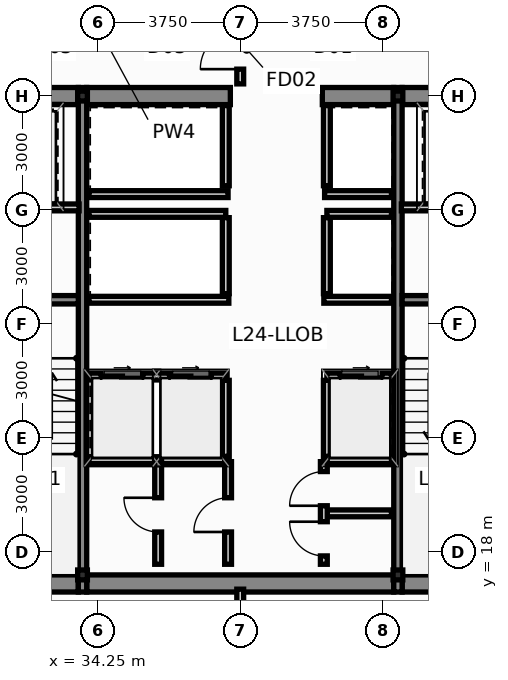
"""IFC4 building model, lengths in metres.
Left out: names, types, materials, properties, quantities, classifications, styles, units other than length and angle.
Written with IfcOpenShell. Run it as: python <this file> out.ifc"""

import sys

from ifc_helpers import new_model, si_unit, direction, frame, frame_2d, origin, origin_2d, place, context, subcontext, project, spatial, rectangle, i_section, extrude, source, transform, mapped, element, fill, save


model = new_model("IFC4")
c1 = context("Model", 3, precision=1e-05, world=origin(), true_north=direction((0.0, 1.0)))
c2 = subcontext(c1, "Body", "Model", "MODEL_VIEW")
j1 = project(units=[si_unit("LENGTHUNIT", "METRE"), si_unit("PLANEANGLEUNIT", "RADIAN")], contexts=[c1])
p1 = place(None, origin())
s1 = spatial("IfcSite", under=j1, at=p1, CompositionType="ELEMENT")
p2 = place(p1, origin())
s2 = spatial("IfcBuilding", under=s1, at=p2, CompositionType="ELEMENT")
p3 = place(p2, frame((0.0, 0.0, 94.45)))
s3 = spatial("IfcBuildingStorey", under=s2, at=p3, CompositionType="ELEMENT", Elevation=94.45)
m1 = source(origin(), c2, "Body", "SweptSolid", [
    extrude(i_section(OverallWidth=0.256, OverallDepth=0.26, WebThickness=0.01, FlangeThickness=0.017, at=origin_2d()), origin(), (0.0, 0.0, 1.0), 3.65),
])
for number, where, z_axis, x_axis in (
    (1, (33.85, 17.4, 0.0), (0.0, 0.0, 1.0), (1.0, 0.0, 0.0)),
    (2, (42.15, 17.4, 0.0), (0.0, 0.0, 1.0), (1.0, 0.0, 0.0)),
    (3, (33.85, 30.0, 0.0), (0.0, 0.0, 1.0), (1.0, 0.0, 0.0)),
    (4, (42.15, 30.0, 0.0), (0.0, 0.0, 1.0), (1.0, 0.0, 0.0)),
):
    element("IfcColumn", number, at=place(p3, frame(where, z_axis=z_axis, x_axis=x_axis)), inside=s3, PredefinedType="COLUMN", context=c2, shape_type="MappedRepresentation", body=[
        mapped(m1, transform((0.0, 0.0, 0.0), scale=1.0)),
    ])
p4 = place(p3, frame((30.84, 17.175, 0.0), z_axis=(0.0, 0.0, 1.0), x_axis=(1.0, 0.0, 0.0)))
e5 = element("IfcWall", 5, at=p4, inside=s3, PredefinedType="SHEAR", context=c2, shape_type="SweptSolid", body=[
    extrude(rectangle(XDim=2.9, YDim=0.45, at=frame_2d((1.45, 0.0))), origin(), (0.0, 0.0, 1.0), 3.65),
])
p5 = place(p3, frame((33.96, 17.175, 0.0), z_axis=(0.0, 0.0, 1.0), x_axis=(1.0, 0.0, 0.0)))
e6 = element("IfcWall", 6, at=p5, inside=s3, PredefinedType="SHEAR", context=c2, shape_type="SweptSolid", body=[
    extrude(rectangle(XDim=8.08, YDim=0.45, at=frame_2d((4.04, 0.0))), origin(), (0.0, 0.0, 1.0), 3.65),
])
for number, where, z_axis, x_axis in (
    (7, (42.26, 17.175, 0.0), (0.0, 0.0, 1.0), (1.0, 0.0, 0.0)),
    (8, (30.84, 30.0, 0.0), (0.0, 0.0, 1.0), (1.0, 0.0, 0.0)),
):
    element("IfcWall", number, at=place(p3, frame(where, z_axis=z_axis, x_axis=x_axis)), inside=s3, PredefinedType="SHEAR", context=c2, shape_type="SweptSolid", body=[
        extrude(rectangle(XDim=2.9, YDim=0.45, at=frame_2d((1.45, 0.0))), origin(), (0.0, 0.0, 1.0), 3.65),
    ])
p6 = place(p3, frame((33.96, 30.0, 0.0), z_axis=(0.0, 0.0, 1.0), x_axis=(1.0, 0.0, 0.0)))
e9 = element("IfcWall", 9, at=p6, inside=s3, PredefinedType="SHEAR", context=c2, shape_type="SweptSolid", body=[
    extrude(rectangle(XDim=3.78, YDim=0.45, at=frame_2d((1.89, 0.0))), origin(), (0.0, 0.0, 1.0), 3.65),
])
p7 = place(p3, frame((40.16, 30.0, 0.0), z_axis=(0.0, 0.0, 1.0), x_axis=(1.0, 0.0, 0.0)))
e10 = element("IfcWall", 10, at=p7, inside=s3, PredefinedType="SHEAR", context=c2, shape_type="SweptSolid", body=[
    extrude(rectangle(XDim=1.88, YDim=0.45, at=frame_2d((0.94, 0.0))), origin(), (0.0, 0.0, 1.0), 3.65),
])
p8 = place(p3, frame((42.26, 30.0, 0.0), z_axis=(0.0, 0.0, 1.0), x_axis=(1.0, 0.0, 0.0)))
e11 = element("IfcWall", 11, at=p8, inside=s3, PredefinedType="SHEAR", context=c2, shape_type="SweptSolid", body=[
    extrude(rectangle(XDim=2.9, YDim=0.45, at=frame_2d((1.45, 0.0))), origin(), (0.0, 0.0, 1.0), 3.65),
])
for number, where, z_axis, x_axis in (
    (12, (33.85, 16.95, 0.0), (0.0, 0.0, 1.0), (0.0, 1.0, 0.0)),
    (13, (42.15, 16.95, 0.0), (0.0, 0.0, 1.0), (0.0, 1.0, 0.0)),
):
    element("IfcWall", number, at=place(p3, frame(where, z_axis=z_axis, x_axis=x_axis)), inside=s3, PredefinedType="SHEAR", context=c2, shape_type="SweptSolid", body=[
        extrude(rectangle(XDim=13.275, YDim=0.22, at=frame_2d((6.638, 0.0))), origin(), (0.0, 0.0, 1.0), 3.65),
    ])
for number, where, z_axis, x_axis in (
    (14, (30.84, 24.64, 0.0), (0.0, 0.0, 1.0), (1.0, 0.0, 0.0)),
    (15, (42.26, 24.64, 0.0), (0.0, 0.0, 1.0), (1.0, 0.0, 0.0)),
):
    element("IfcWall", number, at=place(p3, frame(where, z_axis=z_axis, x_axis=x_axis)), inside=s3, PredefinedType="SHEAR", context=c2, shape_type="SweptSolid", body=[
        extrude(rectangle(XDim=2.9, YDim=0.22, at=frame_2d((1.45, 0.0))), origin(), (0.0, 0.0, 1.0), 3.65),
    ])
p9 = place(p3, frame((34.02, 22.62, 0.0), z_axis=(0.0, 0.0, 1.0), x_axis=(1.0, 0.0, 0.0)))
e16 = element("IfcWall", 16, at=p9, inside=s3, PredefinedType="PARTITIONING", context=c2, shape_type="SweptSolid", body=[
    extrude(rectangle(XDim=3.6, YDim=0.18, at=frame_2d((1.8, 0.0))), origin(), (0.0, 0.0, 1.0), 3.4),
])
p10 = place(p9, frame((0.32, 0.0, 0.0)))
e17 = element("IfcOpeningElement", 17, at=p10, cuts=e16, PredefinedType="OPENING", context=c2, shape_type="SweptSolid", body=[
    extrude(rectangle(XDim=1.1, YDim=2.2, at=frame_2d((0.55, 1.1))), frame((0.0, 0.102, 0.0), z_axis=(0.0, -1.0, 0.0), x_axis=(1.0, 0.0, 0.0)), (0.0, 0.0, 1.0), 0.204),
])
p11 = place(p9, frame((2.12, 0.0, 0.0)))
e18 = element("IfcOpeningElement", 18, at=p11, cuts=e16, PredefinedType="OPENING", context=c2, shape_type="SweptSolid", body=[
    extrude(rectangle(XDim=1.1, YDim=2.2, at=frame_2d((0.55, 1.1))), frame((0.0, 0.102, 0.0), z_axis=(0.0, -1.0, 0.0), x_axis=(1.0, 0.0, 0.0)), (0.0, 0.0, 1.0), 0.204),
])
p12 = place(p3, frame((40.28, 22.62, 0.0), z_axis=(0.0, 0.0, 1.0), x_axis=(1.0, 0.0, 0.0)))
e19 = element("IfcWall", 19, at=p12, inside=s3, PredefinedType="PARTITIONING", context=c2, shape_type="SweptSolid", body=[
    extrude(rectangle(XDim=1.7, YDim=0.18, at=frame_2d((0.85, 0.0))), origin(), (0.0, 0.0, 1.0), 3.4),
])
p13 = place(p12, frame((0.35, 0.0, 0.0)))
e20 = element("IfcOpeningElement", 20, at=p13, cuts=e19, PredefinedType="OPENING", context=c2, shape_type="SweptSolid", body=[
    extrude(rectangle(XDim=1.1, YDim=2.2, at=frame_2d((0.55, 1.1))), frame((0.0, 0.102, 0.0), z_axis=(0.0, -1.0, 0.0), x_axis=(1.0, 0.0, 0.0)), (0.0, 0.0, 1.0), 0.204),
])
for number, where, z_axis, x_axis in (
    (21, (37.62, 20.52, 0.0), (0.0, 0.0, 1.0), (0.0, 1.0, 0.0)),
    (22, (40.28, 20.52, 0.0), (0.0, 0.0, 1.0), (0.0, 1.0, 0.0)),
):
    element("IfcWall", number, at=place(p3, frame(where, z_axis=z_axis, x_axis=x_axis)), inside=s3, PredefinedType="PARTITIONING", context=c2, shape_type="SweptSolid", body=[
        extrude(rectangle(XDim=2.0, YDim=0.18, at=frame_2d((1.0, 0.0))), origin(), (0.0, 0.0, 1.0), 3.4),
    ])
p14 = place(p3, frame((34.02, 26.9, 0.0), z_axis=(0.0, 0.0, 1.0), x_axis=(1.0, 0.0, 0.0)))
e23 = element("IfcWall", 23, at=p14, inside=s3, PredefinedType="PARTITIONING", context=c2, shape_type="SweptSolid", body=[
    extrude(rectangle(XDim=3.6, YDim=0.18, at=frame_2d((1.8, 0.0))), origin(), (0.0, 0.0, 1.0), 3.4),
])
p15 = place(p3, frame((40.28, 26.9, 0.0), z_axis=(0.0, 0.0, 1.0), x_axis=(1.0, 0.0, 0.0)))
e24 = element("IfcWall", 24, at=p15, inside=s3, PredefinedType="PARTITIONING", context=c2, shape_type="SweptSolid", body=[
    extrude(rectangle(XDim=1.7, YDim=0.18, at=frame_2d((0.85, 0.0))), origin(), (0.0, 0.0, 1.0), 3.4),
])
for number, where, z_axis, x_axis in (
    (25, (37.62, 24.8, 0.0), (0.0, 0.0, 1.0), (0.0, 1.0, 0.0)),
    (26, (40.28, 24.8, 0.0), (0.0, 0.0, 1.0), (0.0, 1.0, 0.0)),
):
    element("IfcWall", number, at=place(p3, frame(where, z_axis=z_axis, x_axis=x_axis)), inside=s3, PredefinedType="PARTITIONING", context=c2, shape_type="SweptSolid", body=[
        extrude(rectangle(XDim=2.0, YDim=0.18, at=frame_2d((1.0, 0.0))), origin(), (0.0, 0.0, 1.0), 3.4),
    ])
p16 = place(p3, frame((34.02, 24.64, 0.0), z_axis=(0.0, 0.0, 1.0), x_axis=(1.0, 0.0, 0.0)))
e27 = element("IfcWall", 27, at=p16, inside=s3, PredefinedType="PARTITIONING", context=c2, shape_type="SweptSolid", body=[
    extrude(rectangle(XDim=3.68, YDim=0.18, at=frame_2d((1.84, 0.0))), origin(), (0.0, 0.0, 1.0), 3.4),
])
p17 = place(p3, frame((40.2, 24.64, 0.0), z_axis=(0.0, 0.0, 1.0), x_axis=(1.0, 0.0, 0.0)))
e28 = element("IfcWall", 28, at=p17, inside=s3, PredefinedType="PARTITIONING", context=c2, shape_type="SweptSolid", body=[
    extrude(rectangle(XDim=1.78, YDim=0.18, at=frame_2d((0.89, 0.0))), origin(), (0.0, 0.0, 1.0), 3.4),
])
p18 = place(p3, frame((34.02, 27.42, 0.0), z_axis=(0.0, 0.0, 1.0), x_axis=(1.0, 0.0, 0.0)))
e29 = element("IfcWall", 29, at=p18, inside=s3, PredefinedType="PARTITIONING", context=c2, shape_type="SweptSolid", body=[
    extrude(rectangle(XDim=3.66, YDim=0.18, at=frame_2d((1.83, 0.0))), origin(), (0.0, 0.0, 1.0), 3.4),
])
p19 = place(p3, frame((40.22, 27.42, 0.0), z_axis=(0.0, 0.0, 1.0), x_axis=(1.0, 0.0, 0.0)))
e30 = element("IfcWall", 30, at=p19, inside=s3, PredefinedType="PARTITIONING", context=c2, shape_type="SweptSolid", body=[
    extrude(rectangle(XDim=1.76, YDim=0.18, at=frame_2d((0.88, 0.0))), origin(), (0.0, 0.0, 1.0), 3.4),
])
for number, where, z_axis, x_axis in (
    (31, (37.62, 27.64, 0.0), (0.0, 0.0, 1.0), (0.0, 1.0, 0.0)),
    (32, (40.28, 27.64, 0.0), (0.0, 0.0, 1.0), (0.0, 1.0, 0.0)),
):
    element("IfcWall", number, at=place(p3, frame(where, z_axis=z_axis, x_axis=x_axis)), inside=s3, PredefinedType="PARTITIONING", context=c2, shape_type="SweptSolid", body=[
        extrude(rectangle(XDim=2.11, YDim=0.18, at=frame_2d((1.055, 0.0))), origin(), (0.0, 0.0, 1.0), 3.4),
    ])
for number, where, z_axis, x_axis in (
    (33, (30.86, 27.07, 0.0), (0.0, 0.0, 1.0), (1.0, 0.0, 0.0)),
    (34, (42.24, 27.07, 0.0), (0.0, 0.0, 1.0), (1.0, 0.0, 0.0)),
):
    element("IfcWall", number, at=place(p3, frame(where, z_axis=z_axis, x_axis=x_axis)), inside=s3, PredefinedType="PARTITIONING", context=c2, shape_type="SweptSolid", body=[
        extrude(rectangle(XDim=2.9, YDim=0.18, at=frame_2d((1.45, 0.0))), origin(), (0.0, 0.0, 1.0), 3.4),
    ])
p20 = place(p3, frame((34.02, 20.42, 0.0), z_axis=(0.0, 0.0, 1.0), x_axis=(1.0, 0.0, 0.0)))
e35 = element("IfcWall", 35, at=p20, inside=s3, PredefinedType="PARTITIONING", context=c2, shape_type="SweptSolid", body=[
    extrude(rectangle(XDim=3.64, YDim=0.18, at=frame_2d((1.82, 0.0))), origin(), (0.0, 0.0, 1.0), 3.4),
])
p21 = place(p3, frame((40.22, 20.42, 0.0), z_axis=(0.0, 0.0, 1.0), x_axis=(1.0, 0.0, 0.0)))
e36 = element("IfcWall", 36, at=p21, inside=s3, PredefinedType="PARTITIONING", context=c2, shape_type="SweptSolid", body=[
    extrude(rectangle(XDim=1.76, YDim=0.18, at=frame_2d((0.88, 0.0))), origin(), (0.0, 0.0, 1.0), 3.4),
])
p22 = place(p3, frame((35.84, 17.68, 0.0), z_axis=(0.0, 0.0, 1.0), x_axis=(0.0, 1.0, 0.0)))
e37 = element("IfcWall", 37, at=p22, inside=s3, PredefinedType="PARTITIONING", context=c2, shape_type="SweptSolid", body=[
    extrude(rectangle(XDim=2.7, YDim=0.18, at=frame_2d((1.35, 0.0))), origin(), (0.0, 0.0, 1.0), 3.4),
])
p23 = place(p22, frame((0.85, 0.0, 0.0)))
e38 = element("IfcOpeningElement", 38, at=p23, cuts=e37, PredefinedType="OPENING", context=c2, shape_type="SweptSolid", body=[
    extrude(rectangle(XDim=0.9, YDim=2.1, at=frame_2d((0.45, 1.05))), frame((0.0, 0.102, 0.0), z_axis=(0.0, -1.0, 0.0), x_axis=(1.0, 0.0, 0.0)), (0.0, 0.0, 1.0), 0.204),
])
p24 = place(p3, frame((37.68, 17.68, 0.0), z_axis=(0.0, 0.0, 1.0), x_axis=(0.0, 1.0, 0.0)))
e39 = element("IfcWall", 39, at=p24, inside=s3, PredefinedType="PARTITIONING", context=c2, shape_type="SweptSolid", body=[
    extrude(rectangle(XDim=2.7, YDim=0.18, at=frame_2d((1.35, 0.0))), origin(), (0.0, 0.0, 1.0), 3.4),
])
p25 = place(p24, frame((0.85, 0.0, 0.0)))
e40 = element("IfcOpeningElement", 40, at=p25, cuts=e39, PredefinedType="OPENING", context=c2, shape_type="SweptSolid", body=[
    extrude(rectangle(XDim=0.9, YDim=2.1, at=frame_2d((0.45, 1.05))), frame((0.0, 0.102, 0.0), z_axis=(0.0, -1.0, 0.0), x_axis=(1.0, 0.0, 0.0)), (0.0, 0.0, 1.0), 0.204),
])
p26 = place(p3, frame((40.28, 19.02, 0.0), z_axis=(0.0, 0.0, 1.0), x_axis=(1.0, 0.0, 0.0)))
e41 = element("IfcWall", 41, at=p26, inside=s3, PredefinedType="PARTITIONING", context=c2, shape_type="SweptSolid", body=[
    extrude(rectangle(XDim=1.7, YDim=0.18, at=frame_2d((0.85, 0.0))), origin(), (0.0, 0.0, 1.0), 3.4),
])
p27 = place(p3, frame((40.2, 17.68, 0.0), z_axis=(0.0, 0.0, 1.0), x_axis=(0.0, 1.0, 0.0)))
e42 = element("IfcWall", 42, at=p27, inside=s3, PredefinedType="PARTITIONING", context=c2, shape_type="SweptSolid", body=[
    extrude(rectangle(XDim=2.7, YDim=0.18, at=frame_2d((1.35, 0.0))), origin(), (0.0, 0.0, 1.0), 3.4),
])
p28 = place(p27, frame((0.22, 0.0, 0.0)))
e43 = element("IfcOpeningElement", 43, at=p28, cuts=e42, PredefinedType="OPENING", context=c2, shape_type="SweptSolid", body=[
    extrude(rectangle(XDim=0.9, YDim=2.1, at=frame_2d((0.45, 1.05))), frame((0.0, 0.102, 0.0), z_axis=(0.0, -1.0, 0.0), x_axis=(1.0, 0.0, 0.0)), (0.0, 0.0, 1.0), 0.204),
])
p29 = place(p27, frame((1.54, 0.0, 0.0)))
e44 = element("IfcOpeningElement", 44, at=p29, cuts=e42, PredefinedType="OPENING", context=c2, shape_type="SweptSolid", body=[
    extrude(rectangle(XDim=0.9, YDim=2.1, at=frame_2d((0.45, 1.05))), frame((0.0, 0.102, 0.0), z_axis=(0.0, -1.0, 0.0), x_axis=(1.0, 0.0, 0.0)), (0.0, 0.0, 1.0), 0.204),
])
p30 = place(p3, frame((38.0, 15.205, 0.0), z_axis=(0.0, 0.0, 1.0), x_axis=(0.0, 1.0, 0.0)))
e45 = element("IfcWall", 45, at=p30, inside=s3, PredefinedType="PARTITIONING", context=c2, shape_type="SweptSolid", body=[
    extrude(rectangle(XDim=1.82, YDim=0.18, at=frame_2d((0.91, 0.0))), origin(), (0.0, 0.0, 1.0), 3.4),
])
p31 = place(p30, frame((0.385, 0.0, 0.0)))
e46 = element("IfcOpeningElement", 46, at=p31, cuts=e45, PredefinedType="OPENING", context=c2, shape_type="SweptSolid", body=[
    extrude(rectangle(XDim=1.05, YDim=2.15, at=frame_2d((0.525, 1.075))), frame((0.0, 0.102, 0.0), z_axis=(0.0, -1.0, 0.0), x_axis=(1.0, 0.0, 0.0)), (0.0, 0.0, 1.0), 0.204),
])
p32 = place(p3, frame((38.0, 30.32, 0.0), z_axis=(0.0, 0.0, 1.0), x_axis=(0.0, 1.0, 0.0)))
e47 = element("IfcWall", 47, at=p32, inside=s3, PredefinedType="PARTITIONING", context=c2, shape_type="SweptSolid", body=[
    extrude(rectangle(XDim=1.825, YDim=0.18, at=frame_2d((0.913, 0.0))), origin(), (0.0, 0.0, 1.0), 3.4),
])
p33 = place(p32, frame((0.388, 0.0, 0.0)))
e48 = element("IfcOpeningElement", 48, at=p33, cuts=e47, PredefinedType="OPENING", context=c2, shape_type="SweptSolid", body=[
    extrude(rectangle(XDim=1.05, YDim=2.15, at=frame_2d((0.525, 1.075))), frame((0.0, 0.102, 0.0), z_axis=(0.0, -1.0, 0.0), x_axis=(1.0, 0.0, 0.0)), (0.0, 0.0, 1.0), 0.204),
])
p34 = place(p10, origin())
e49 = element("IfcDoor", 49, at=p34, inside=s3, OperationType="SLIDING_TO_LEFT", PredefinedType="DOOR", context=c2, shape_type="SweptSolid", body=[
    extrude(rectangle(XDim=1.1, YDim=2.2, at=frame_2d((0.55, 1.1))), frame((0.0, 0.025, 0.0), z_axis=(0.0, -1.0, 0.0), x_axis=(1.0, 0.0, 0.0)), (0.0, 0.0, 1.0), 0.05),
])
fill(e17, e49)
p35 = place(p11, origin())
e50 = element("IfcDoor", 50, at=p35, inside=s3, OperationType="SLIDING_TO_RIGHT", PredefinedType="DOOR", context=c2, shape_type="SweptSolid", body=[
    extrude(rectangle(XDim=1.1, YDim=2.2, at=frame_2d((0.55, 1.1))), frame((0.0, 0.025, 0.0), z_axis=(0.0, -1.0, 0.0), x_axis=(1.0, 0.0, 0.0)), (0.0, 0.0, 1.0), 0.05),
])
fill(e18, e50)
p36 = place(p13, origin())
e51 = element("IfcDoor", 51, at=p36, inside=s3, OperationType="SLIDING_TO_LEFT", PredefinedType="DOOR", context=c2, shape_type="SweptSolid", body=[
    extrude(rectangle(XDim=1.1, YDim=2.2, at=frame_2d((0.55, 1.1))), frame((0.0, 0.025, 0.0), z_axis=(0.0, -1.0, 0.0), x_axis=(1.0, 0.0, 0.0)), (0.0, 0.0, 1.0), 0.05),
])
fill(e20, e51)
p37 = place(p23, origin())
e52 = element("IfcDoor", 52, at=p37, inside=s3, OperationType="SINGLE_SWING_RIGHT", PredefinedType="DOOR", context=c2, shape_type="SweptSolid", body=[
    extrude(rectangle(XDim=0.9, YDim=2.1, at=frame_2d((0.45, 1.05))), frame((0.0, 0.025, 0.0), z_axis=(0.0, -1.0, 0.0), x_axis=(1.0, 0.0, 0.0)), (0.0, 0.0, 1.0), 0.05),
])
fill(e38, e52)
p38 = place(p25, origin())
e53 = element("IfcDoor", 53, at=p38, inside=s3, OperationType="SINGLE_SWING_LEFT", PredefinedType="DOOR", context=c2, shape_type="SweptSolid", body=[
    extrude(rectangle(XDim=0.9, YDim=2.1, at=frame_2d((0.45, 1.05))), frame((0.0, 0.025, 0.0), z_axis=(0.0, -1.0, 0.0), x_axis=(1.0, 0.0, 0.0)), (0.0, 0.0, 1.0), 0.05),
])
fill(e40, e53)
p39 = place(p28, origin())
e54 = element("IfcDoor", 54, at=p39, inside=s3, OperationType="SINGLE_SWING_RIGHT", PredefinedType="DOOR", context=c2, shape_type="SweptSolid", body=[
    extrude(rectangle(XDim=0.9, YDim=2.1, at=frame_2d((0.45, 1.05))), frame((0.0, 0.025, 0.0), z_axis=(0.0, -1.0, 0.0), x_axis=(1.0, 0.0, 0.0)), (0.0, 0.0, 1.0), 0.05),
])
fill(e43, e54)
p40 = place(p29, origin())
e55 = element("IfcDoor", 55, at=p40, inside=s3, OperationType="SINGLE_SWING_LEFT", PredefinedType="DOOR", context=c2, shape_type="SweptSolid", body=[
    extrude(rectangle(XDim=0.9, YDim=2.1, at=frame_2d((0.45, 1.05))), frame((0.0, 0.025, 0.0), z_axis=(0.0, -1.0, 0.0), x_axis=(1.0, 0.0, 0.0)), (0.0, 0.0, 1.0), 0.05),
])
fill(e44, e55)
p41 = place(p33, origin())
e56 = element("IfcDoor", 56, at=p41, inside=s3, OperationType="SINGLE_SWING_LEFT", PredefinedType="DOOR", context=c2, shape_type="SweptSolid", body=[
    extrude(rectangle(XDim=1.05, YDim=2.15, at=frame_2d((0.525, 1.075))), frame((0.0, 0.025, 0.0), z_axis=(0.0, -1.0, 0.0), x_axis=(1.0, 0.0, 0.0)), (0.0, 0.0, 1.0), 0.05),
])
fill(e48, e56)
save(model, sys.argv[1])
